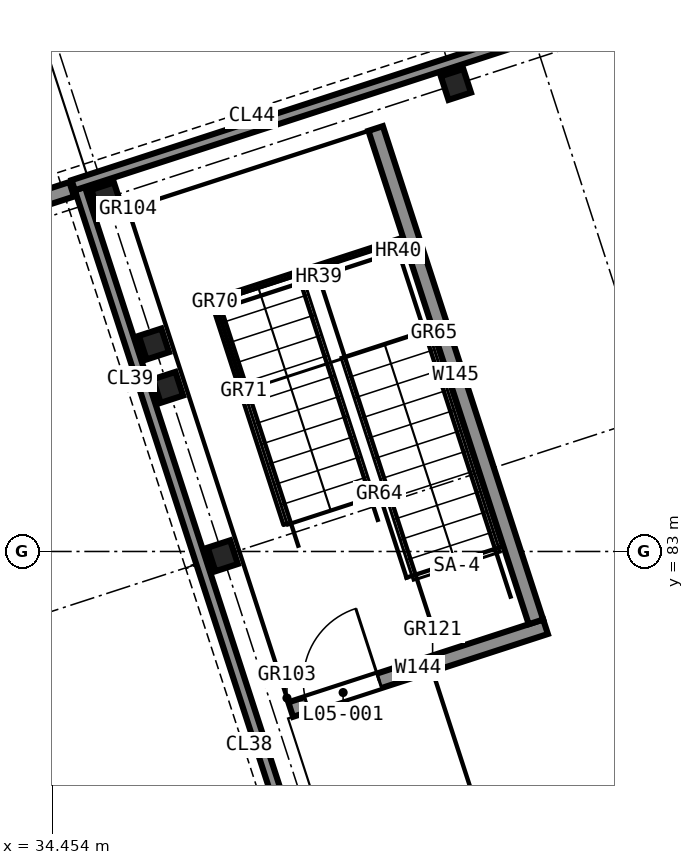
"""IFC4 building model, lengths in metres.
Left out: names, types, materials, properties, quantities, classifications, styles, units other than length and angle.
Written with IfcOpenShell. Run it as: python <this file> out.ifc"""

import sys

from ifc_helpers import new_model, si_unit, direction, frame, frame_2d, origin, origin_2d, place, context, subcontext, project, spatial, rectangle, i_section, extrude, element, fill, save


model = new_model("IFC4")
c1 = context("Model", 3, precision=1e-05, world=origin(), true_north=direction((0.0, 1.0)))
c2 = subcontext(c1, "Body", "Model", "MODEL_VIEW")
j1 = project(units=[si_unit("LENGTHUNIT", "METRE"), si_unit("PLANEANGLEUNIT", "RADIAN")], contexts=[c1])
p1 = place(None, origin())
s1 = spatial("IfcSite", under=j1, at=p1, CompositionType="ELEMENT")
p2 = place(p1, origin())
s2 = spatial("IfcBuilding", under=s1, at=p2, CompositionType="ELEMENT")
p3 = place(p2, frame((0.0, 0.0, 21.5)))
s3 = spatial("IfcBuildingStorey", under=s2, at=p3, CompositionType="ELEMENT", Elevation=21.5)
for number, where, z_axis, x_axis in (
    (1, (35.977, 85.159, 0.0), (0.0, 0.0, 1.0), (0.951, 0.309, 0.0)),
    (2, (35.792, 85.729, 0.0), (0.0, 0.0, 1.0), (0.951, 0.309, 0.0)),
):
    element("IfcColumn", number, at=place(p3, frame(where, z_axis=z_axis, x_axis=x_axis)), inside=s3, PredefinedType="COLUMN", context=c2, shape_type="SweptSolid", body=[
        extrude(i_section(OverallWidth=0.311, OverallDepth=0.327, WebThickness=0.016, FlangeThickness=0.025, FilletRadius=0.017, at=origin_2d()), origin(), (0.0, 0.0, 1.0), 3.85),
    ])
p4 = place(p3, frame((37.591, 80.92, 0.0), z_axis=(0.0, 0.0, 1.0), x_axis=(0.951052389726, 0.30902969436, 0.0)))
e3 = element("IfcWall", 3, at=p4, inside=s3, PredefinedType="SOLIDWALL", context=c2, shape_type="SweptSolid", body=[
    extrude(rectangle(XDim=3.525, YDim=0.2, at=frame_2d((1.763, 0.0))), origin(), (0.0, 0.0, 1.0), 4.0),
])
p5 = place(p4, frame((0.225, 0.0, 0.0)))
e4 = element("IfcOpeningElement", 4, at=p5, cuts=e3, PredefinedType="OPENING", context=c2, shape_type="SweptSolid", body=[
    extrude(rectangle(XDim=1.0, YDim=2.1, at=frame_2d((0.5, 1.05))), frame((0.0, 0.11, 0.0), z_axis=(0.0, -1.0, 0.0), x_axis=(1.0, 0.0, 0.0)), (0.0, 0.0, 1.0), 0.22),
])
p6 = place(p3, frame((40.817, 82.074, 0.0), z_axis=(0.0, 0.0, 1.0), x_axis=(-0.309028643499, 0.951052731186, 0.0)))
e5 = element("IfcWall", 5, at=p6, inside=s3, PredefinedType="SOLIDWALL", context=c2, shape_type="SweptSolid", body=[
    extrude(rectangle(XDim=6.825, YDim=0.2, at=frame_2d((3.413, 0.0))), origin(), (0.0, 0.0, 1.0), 4.0),
])
for number, where, z_axis, x_axis in (
    (6, (36.697, 82.943, 0.0), (0.0, 0.0, 1.0), (0.951, 0.309, 0.0)),
    (7, (35.167, 87.651, 0.0), (0.0, 0.0, 1.0), (0.951, 0.309, 0.0)),
):
    element("IfcColumn", number, at=place(p3, frame(where, z_axis=z_axis, x_axis=x_axis)), inside=s3, PredefinedType="COLUMN", context=c2, shape_type="SweptSolid", body=[
        extrude(i_section(OverallWidth=0.311, OverallDepth=0.327, WebThickness=0.016, FlangeThickness=0.025, FilletRadius=0.017, at=origin_2d()), origin(), (0.0, 0.0, 1.0), 4.0),
    ])
p7 = place(p3, frame((39.764, 89.144, 0.0), z_axis=(0.0, 0.0, 1.0), x_axis=(0.951056516295, 0.309016994375, 0.0)))
e8 = element("IfcColumn", 8, at=p7, inside=s3, PredefinedType="COLUMN", context=c2, shape_type="SweptSolid", body=[
    extrude(i_section(OverallWidth=0.311, OverallDepth=0.327, WebThickness=0.016, FlangeThickness=0.025, FilletRadius=0.017, at=origin_2d()), origin(), (0.0, 0.0, 1.0), 3.85),
])
p8 = place(p3, frame((41.129, 68.348, 0.0), z_axis=(0.0, 0.0, 1.0), x_axis=(-0.309010933888, 0.951058485445, 0.0)))
e9 = element("IfcWall", 9, at=p8, inside=s3, PredefinedType="SOLIDWALL", context=c2, shape_type="SweptSolid", body=[
    extrude(rectangle(XDim=20.425, YDim=0.14, at=frame_2d((10.212, 0.0))), origin(), (0.0, 0.0, 1.0), 4.0),
])
p9 = place(p3, frame((34.729, 87.819, 0.0), z_axis=(0.0, 0.0, 1.0), x_axis=(0.951057118925, 0.309015139665, 0.0)))
e10 = element("IfcWall", 10, at=p9, inside=s3, PredefinedType="SOLIDWALL", context=c2, shape_type="SweptSolid", body=[
    extrude(rectangle(XDim=29.73, YDim=0.14, at=frame_2d((14.865, 0.0))), origin(), (0.0, 0.0, 1.0), 4.0),
])
p10 = place(p3, frame((34.709, 87.765, 0.0), z_axis=(0.0, 0.0, 1.0), x_axis=(-0.951056406022, -0.30901733376, 0.0)))
e11 = element("IfcWall", 11, at=p10, inside=s3, PredefinedType="PARAPET", context=c2, shape_type="SweptSolid", body=[
    extrude(rectangle(XDim=15.5, YDim=0.2, at=frame_2d((7.75, 0.0))), origin(), (0.0, 0.0, 1.0), 1.0),
])
p11 = place(p5, origin())
e12 = element("IfcDoor", 12, at=p11, inside=s3, OperationType="SINGLE_SWING_LEFT", PredefinedType="DOOR", context=c2, shape_type="SweptSolid", body=[
    extrude(rectangle(XDim=1.0, YDim=2.1, at=frame_2d((0.5, 1.05))), frame((0.0, 0.025, 0.0), z_axis=(0.0, -1.0, 0.0), x_axis=(1.0, 0.0, 0.0)), (0.0, 0.0, 1.0), 0.05),
])
fill(e4, e12)
save(model, sys.argv[1])
